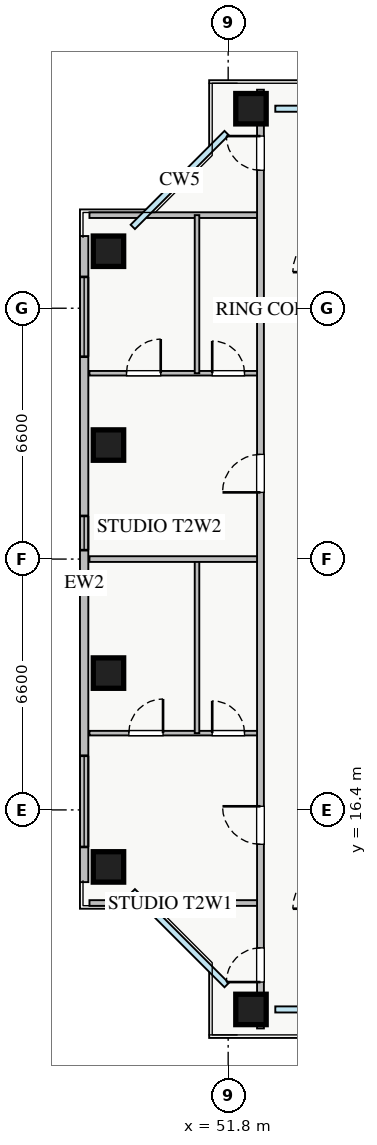
"""IFC4 building model, lengths in metres.
Left out: names, types, materials, properties, quantities, classifications, styles, units other than length and angle.
Written with IfcOpenShell. Run it as: python <this file> out.ifc"""

import sys

from ifc_helpers import new_model, si_unit, direction, frame, frame_2d, origin, origin_2d, place, context, subcontext, project, spatial, rectangle, extrude, source, transform, mapped, element, fill, save


model = new_model("IFC4")
c1 = context("Model", 3, precision=1e-05, world=origin(), true_north=direction((0.0, 1.0)))
c2 = subcontext(c1, "Body", "Model", "MODEL_VIEW")
j1 = project(units=[si_unit("LENGTHUNIT", "METRE"), si_unit("PLANEANGLEUNIT", "RADIAN")], contexts=[c1])
p1 = place(None, origin())
s1 = spatial("IfcSite", under=j1, at=p1, CompositionType="ELEMENT")
p2 = place(p1, origin())
s2 = spatial("IfcBuilding", under=s1, at=p2, CompositionType="ELEMENT")
p3 = place(p2, frame((0.0, 0.0, 86.0)))
s3 = spatial("IfcBuildingStorey", under=s2, at=p3, CompositionType="ELEMENT", Elevation=86.0)
m1 = source(origin(), c2, "Body", "SweptSolid", [
    extrude(rectangle(XDim=0.8, YDim=0.8, at=origin_2d()), origin(), (0.0, 0.0, 1.0), 3.25),
])
for number, where, z_axis, x_axis in (
    (1, (52.4, 11.15, 0.0), (0.0, 0.0, 1.0), (1.0, 0.0, 0.0)),
    (2, (52.4, 34.85, 0.0), (0.0, 0.0, 1.0), (1.0, 0.0, 0.0)),
    (3, (48.65, 14.9, 0.0), (0.0, 0.0, 1.0), (1.0, 0.0, 0.0)),
    (4, (48.65, 20.0, 0.0), (0.0, 0.0, 1.0), (1.0, 0.0, 0.0)),
    (5, (48.65, 26.0, 0.0), (0.0, 0.0, 1.0), (1.0, 0.0, 0.0)),
    (6, (48.65, 31.1, 0.0), (0.0, 0.0, 1.0), (1.0, 0.0, 0.0)),
):
    element("IfcColumn", number, at=place(p3, frame(where, z_axis=z_axis, x_axis=x_axis)), inside=s3, PredefinedType="COLUMN", context=c2, shape_type="MappedRepresentation", body=[
        mapped(m1, transform((0.0, 0.0, 0.0), x_axis=(1.0, 0.0, 0.0), y_axis=(0.0, 1.0, 0.0), z_axis=(0.0, 0.0, 1.0), scale=1.0)),
    ])
p4 = place(p3, frame((48.01, 14.5, 0.0), z_axis=(0.0, 0.0, 1.0), x_axis=(0.0, 1.0, 0.0)))
e7 = element("IfcWall", 7, at=p4, inside=s3, PredefinedType="STANDARD", context=c2, shape_type="SweptSolid", body=[
    extrude(rectangle(XDim=17.0, YDim=0.22, at=frame_2d((8.5, 0.0))), origin(), (0.0, 0.0, 1.0), 2.61),
])
p5 = place(p4, frame((0.925, 0.0, 0.9)))
e8 = element("IfcOpeningElement", 8, at=p5, cuts=e7, PredefinedType="OPENING", context=c2, shape_type="SweptSolid", body=[
    extrude(rectangle(XDim=2.4, YDim=1.48, at=frame_2d((1.2, 0.74))), frame((0.0, 0.12, 0.0), z_axis=(0.0, -1.0, 0.0), x_axis=(1.0, 0.0, 0.0)), (0.0, 0.0, 1.0), 0.24),
])
p6 = place(p4, frame((13.825, 0.0, 0.9)))
e9 = element("IfcOpeningElement", 9, at=p6, cuts=e7, PredefinedType="OPENING", context=c2, shape_type="SweptSolid", body=[
    extrude(rectangle(XDim=2.1, YDim=1.48, at=frame_2d((1.05, 0.74))), frame((0.0, 0.12, 0.0), z_axis=(0.0, -1.0, 0.0), x_axis=(1.0, 0.0, 0.0)), (0.0, 0.0, 1.0), 0.24),
])
p7 = place(p4, frame((8.735, 0.0, 0.9)))
e10 = element("IfcOpeningElement", 10, at=p7, cuts=e7, PredefinedType="OPENING", context=c2, shape_type="SweptSolid", body=[
    extrude(rectangle(XDim=0.9, YDim=1.2, at=frame_2d((0.45, 0.6))), frame((0.0, 0.12, 0.0), z_axis=(0.0, -1.0, 0.0), x_axis=(1.0, 0.0, 0.0)), (0.0, 0.0, 1.0), 0.24),
])
for number, where, z_axis, x_axis in (
    (11, (48.15, 32.05, 0.0), (0.0, 0.0, 1.0), (1.0, 0.0, 0.0)),
    (12, (48.15, 13.95, 0.0), (0.0, 0.0, 1.0), (1.0, 0.0, 0.0)),
):
    element("IfcWall", number, at=place(p3, frame(where, z_axis=z_axis, x_axis=x_axis)), inside=s3, PredefinedType="PARTITIONING", context=c2, shape_type="SweptSolid", body=[
        extrude(rectangle(XDim=4.5, YDim=0.15, at=frame_2d((2.25, 0.0))), origin(), (0.0, 0.0, 1.0), 3.07),
    ])
p8 = place(p3, frame((48.15, 18.42, 0.0), z_axis=(0.0, 0.0, 1.0), x_axis=(1.0, 0.0, 0.0)))
e13 = element("IfcWall", 13, at=p8, inside=s3, PredefinedType="PLUMBINGWALL", context=c2, shape_type="SweptSolid", body=[
    extrude(rectangle(XDim=4.5, YDim=0.12, at=frame_2d((2.25, 0.0))), origin(), (0.0, 0.0, 1.0), 2.815),
])
p9 = place(p8, frame((1.036, 0.0, 0.0)))
e14 = element("IfcOpeningElement", 14, at=p9, cuts=e13, PredefinedType="OPENING", context=c2, shape_type="SweptSolid", body=[
    extrude(rectangle(XDim=0.9, YDim=2.05, at=frame_2d((0.45, 1.025))), frame((0.0, 0.07, 0.0), z_axis=(0.0, -1.0, 0.0), x_axis=(1.0, 0.0, 0.0)), (0.0, 0.0, 1.0), 0.14),
])
p10 = place(p8, frame((3.23, 0.0, 0.0)))
e15 = element("IfcOpeningElement", 15, at=p10, cuts=e13, PredefinedType="OPENING", context=c2, shape_type="SweptSolid", body=[
    extrude(rectangle(XDim=0.85, YDim=2.05, at=frame_2d((0.425, 1.025))), frame((0.0, 0.07, 0.0), z_axis=(0.0, -1.0, 0.0), x_axis=(1.0, 0.0, 0.0)), (0.0, 0.0, 1.0), 0.14),
])
p11 = place(p3, frame((50.98, 18.42, 0.0), z_axis=(0.0, 0.0, 1.0), x_axis=(0.0, 1.0, 0.0)))
e16 = element("IfcWall", 16, at=p11, inside=s3, PredefinedType="PLUMBINGWALL", context=c2, shape_type="SweptSolid", body=[
    extrude(rectangle(XDim=4.58, YDim=0.12, at=frame_2d((2.29, 0.0))), origin(), (0.0, 0.0, 1.0), 3.07),
])
p12 = place(p3, frame((48.15, 27.89, 0.0), z_axis=(0.0, 0.0, 1.0), x_axis=(1.0, 0.0, 0.0)))
e17 = element("IfcWall", 17, at=p12, inside=s3, PredefinedType="PLUMBINGWALL", context=c2, shape_type="SweptSolid", body=[
    extrude(rectangle(XDim=4.5, YDim=0.12, at=frame_2d((2.25, 0.0))), origin(), (0.0, 0.0, 1.0), 3.07),
])
p13 = place(p12, frame((0.975, 0.0, 0.0)))
e18 = element("IfcOpeningElement", 18, at=p13, cuts=e17, PredefinedType="OPENING", context=c2, shape_type="SweptSolid", body=[
    extrude(rectangle(XDim=0.9, YDim=2.05, at=frame_2d((0.45, 1.025))), frame((0.0, 0.07, 0.0), z_axis=(0.0, -1.0, 0.0), x_axis=(1.0, 0.0, 0.0)), (0.0, 0.0, 1.0), 0.14),
])
p14 = place(p12, frame((3.23, 0.0, 0.0)))
e19 = element("IfcOpeningElement", 19, at=p14, cuts=e17, PredefinedType="OPENING", context=c2, shape_type="SweptSolid", body=[
    extrude(rectangle(XDim=0.85, YDim=2.05, at=frame_2d((0.425, 1.025))), frame((0.0, 0.07, 0.0), z_axis=(0.0, -1.0, 0.0), x_axis=(1.0, 0.0, 0.0)), (0.0, 0.0, 1.0), 0.14),
])
p15 = place(p3, frame((50.98, 27.89, 0.0), z_axis=(0.0, 0.0, 1.0), x_axis=(0.0, 1.0, 0.0)))
e20 = element("IfcWall", 20, at=p15, inside=s3, PredefinedType="PLUMBINGWALL", context=c2, shape_type="SweptSolid", body=[
    extrude(rectangle(XDim=4.16, YDim=0.12, at=frame_2d((2.08, 0.0))), origin(), (0.0, 0.0, 1.0), 3.07),
])
p16 = place(p3, frame((48.15, 23.0, 0.0), z_axis=(0.0, 0.0, 1.0), x_axis=(1.0, 0.0, 0.0)))
e21 = element("IfcWall", 21, at=p16, inside=s3, PredefinedType="PARTITIONING", context=c2, shape_type="SweptSolid", body=[
    extrude(rectangle(XDim=4.5, YDim=0.15, at=frame_2d((2.25, 0.0))), origin(), (0.0, 0.0, 1.0), 2.815),
])
p17 = place(p3, frame((52.65, 10.65, 0.0), z_axis=(0.0, 0.0, 1.0), x_axis=(0.0, 1.0, 0.0)))
e22 = element("IfcWall", 22, at=p17, inside=s3, PredefinedType="PARTITIONING", context=c2, shape_type="SweptSolid", body=[
    extrude(rectangle(XDim=24.7, YDim=0.18, at=frame_2d((12.35, 0.0))), origin(), (0.0, 0.0, 1.0), 2.615),
])
p18 = place(p17, frame((22.58, 0.0, 0.0)))
e23 = element("IfcOpeningElement", 23, at=p18, cuts=e22, PredefinedType="OPENING", context=c2, shape_type="SweptSolid", body=[
    extrude(rectangle(XDim=0.9, YDim=2.05, at=frame_2d((0.45, 1.025))), frame((0.0, 0.1, 0.0), z_axis=(0.0, -1.0, 0.0), x_axis=(1.0, 0.0, 0.0)), (0.0, 0.0, 1.0), 0.2),
])
p19 = place(p17, frame((1.22, 0.0, 0.0)))
e24 = element("IfcOpeningElement", 24, at=p19, cuts=e22, PredefinedType="OPENING", context=c2, shape_type="SweptSolid", body=[
    extrude(rectangle(XDim=0.9, YDim=2.05, at=frame_2d((0.45, 1.025))), frame((0.0, 0.1, 0.0), z_axis=(0.0, -1.0, 0.0), x_axis=(1.0, 0.0, 0.0)), (0.0, 0.0, 1.0), 0.2),
])
p20 = place(p17, frame((4.845, 0.0, 0.0)))
e25 = element("IfcOpeningElement", 25, at=p20, cuts=e22, PredefinedType="OPENING", context=c2, shape_type="SweptSolid", body=[
    extrude(rectangle(XDim=1.0, YDim=2.05, at=frame_2d((0.5, 1.025))), frame((0.0, 0.1, 0.0), z_axis=(0.0, -1.0, 0.0), x_axis=(1.0, 0.0, 0.0)), (0.0, 0.0, 1.0), 0.2),
])
p21 = place(p17, frame((14.105, 0.0, 0.0)))
e26 = element("IfcOpeningElement", 26, at=p21, cuts=e22, PredefinedType="OPENING", context=c2, shape_type="SweptSolid", body=[
    extrude(rectangle(XDim=1.0, YDim=2.05, at=frame_2d((0.5, 1.025))), frame((0.0, 0.1, 0.0), z_axis=(0.0, -1.0, 0.0), x_axis=(1.0, 0.0, 0.0)), (0.0, 0.0, 1.0), 0.2),
])
m2 = source(origin(), c2, "Body", "SweptSolid", [
    extrude(rectangle(XDim=2.4, YDim=1.48, at=frame_2d((1.2, 0.74))), frame((0.0, 0.03, 0.0), z_axis=(0.0, -1.0, 0.0), x_axis=(1.0, 0.0, 0.0)), (0.0, 0.0, 1.0), 0.06),
])
p22 = place(p5, origin())
e27 = element("IfcWindow", 27, at=p22, inside=s3, PartitioningType="TRIPLE_PANEL_VERTICAL", PredefinedType="WINDOW", context=c2, shape_type="MappedRepresentation", body=[
    mapped(m2, transform((0.0, 0.0, 0.0), x_axis=(1.0, 0.0, 0.0), y_axis=(0.0, 1.0, 0.0), z_axis=(0.0, 0.0, 1.0), scale=1.0)),
])
fill(e8, e27)
m3 = source(origin(), c2, "Body", "SweptSolid", [
    extrude(rectangle(XDim=2.1, YDim=1.48, at=frame_2d((1.05, 0.74))), frame((0.0, 0.03, 0.0), z_axis=(0.0, -1.0, 0.0), x_axis=(1.0, 0.0, 0.0)), (0.0, 0.0, 1.0), 0.06),
])
p23 = place(p6, origin())
e28 = element("IfcWindow", 28, at=p23, inside=s3, PartitioningType="TRIPLE_PANEL_VERTICAL", PredefinedType="WINDOW", context=c2, shape_type="MappedRepresentation", body=[
    mapped(m3, transform((0.0, 0.0, 0.0), x_axis=(1.0, 0.0, 0.0), y_axis=(0.0, 1.0, 0.0), z_axis=(0.0, 0.0, 1.0), scale=1.0)),
])
fill(e9, e28)
m4 = source(origin(), c2, "Body", "SweptSolid", [
    extrude(rectangle(XDim=0.9, YDim=2.05, at=frame_2d((0.45, 1.025))), frame((0.0, 0.025, 0.0), z_axis=(0.0, -1.0, 0.0), x_axis=(1.0, 0.0, 0.0)), (0.0, 0.0, 1.0), 0.05),
])
p24 = place(p9, origin())
e29 = element("IfcDoor", 29, at=p24, inside=s3, OperationType="SINGLE_SWING_RIGHT", PredefinedType="DOOR", context=c2, shape_type="MappedRepresentation", body=[
    mapped(m4, transform((0.0, 0.0, 0.0), x_axis=(1.0, 0.0, 0.0), y_axis=(0.0, 1.0, 0.0), z_axis=(0.0, 0.0, 1.0), scale=1.0)),
])
fill(e14, e29)
m5 = source(origin(), c2, "Body", "SweptSolid", [
    extrude(rectangle(XDim=0.85, YDim=2.05, at=frame_2d((0.425, 1.025))), frame((0.0, 0.025, 0.0), z_axis=(0.0, -1.0, 0.0), x_axis=(1.0, 0.0, 0.0)), (0.0, 0.0, 1.0), 0.05),
])
p25 = place(p10, origin())
e30 = element("IfcDoor", 30, at=p25, inside=s3, OperationType="SINGLE_SWING_LEFT", PredefinedType="DOOR", context=c2, shape_type="MappedRepresentation", body=[
    mapped(m5, transform((0.0, 0.0, 0.0), x_axis=(1.0, 0.0, 0.0), y_axis=(0.0, 1.0, 0.0), z_axis=(0.0, 0.0, 1.0), scale=1.0)),
])
fill(e15, e30)
p26 = place(p13, origin())
e31 = element("IfcDoor", 31, at=p26, inside=s3, OperationType="SINGLE_SWING_RIGHT", PredefinedType="DOOR", context=c2, shape_type="MappedRepresentation", body=[
    mapped(m4, transform((0.0, 0.0, 0.0), x_axis=(1.0, 0.0, 0.0), y_axis=(0.0, 1.0, 0.0), z_axis=(0.0, 0.0, 1.0), scale=1.0)),
])
fill(e18, e31)
p27 = place(p14, origin())
e32 = element("IfcDoor", 32, at=p27, inside=s3, OperationType="SINGLE_SWING_LEFT", PredefinedType="DOOR", context=c2, shape_type="MappedRepresentation", body=[
    mapped(m5, transform((0.0, 0.0, 0.0), x_axis=(1.0, 0.0, 0.0), y_axis=(0.0, 1.0, 0.0), z_axis=(0.0, 0.0, 1.0), scale=1.0)),
])
fill(e19, e32)
p28 = place(p18, origin())
e33 = element("IfcDoor", 33, at=p28, inside=s3, OperationType="SINGLE_SWING_RIGHT", PredefinedType="DOOR", context=c2, shape_type="MappedRepresentation", body=[
    mapped(m4, transform((0.0, 0.0, 0.0), x_axis=(1.0, 0.0, 0.0), y_axis=(0.0, 1.0, 0.0), z_axis=(0.0, 0.0, 1.0), scale=1.0)),
])
fill(e23, e33)
p29 = place(p19, origin())
e34 = element("IfcDoor", 34, at=p29, inside=s3, OperationType="SINGLE_SWING_LEFT", PredefinedType="DOOR", context=c2, shape_type="MappedRepresentation", body=[
    mapped(m4, transform((0.0, 0.0, 0.0), x_axis=(1.0, 0.0, 0.0), y_axis=(0.0, 1.0, 0.0), z_axis=(0.0, 0.0, 1.0), scale=1.0)),
])
fill(e24, e34)
m6 = source(origin(), c2, "Body", "SweptSolid", [
    extrude(rectangle(XDim=1.0, YDim=2.05, at=frame_2d((0.5, 1.025))), frame((0.0, 0.025, 0.0), z_axis=(0.0, -1.0, 0.0), x_axis=(1.0, 0.0, 0.0)), (0.0, 0.0, 1.0), 0.05),
])
p30 = place(p20, origin())
e35 = element("IfcDoor", 35, at=p30, inside=s3, OperationType="SINGLE_SWING_RIGHT", PredefinedType="DOOR", context=c2, shape_type="MappedRepresentation", body=[
    mapped(m6, transform((0.0, 0.0, 0.0), x_axis=(1.0, 0.0, 0.0), y_axis=(0.0, 1.0, 0.0), z_axis=(0.0, 0.0, 1.0), scale=1.0)),
])
fill(e25, e35)
p31 = place(p21, origin())
e36 = element("IfcDoor", 36, at=p31, inside=s3, OperationType="SINGLE_SWING_LEFT", PredefinedType="DOOR", context=c2, shape_type="MappedRepresentation", body=[
    mapped(m6, transform((0.0, 0.0, 0.0), x_axis=(1.0, 0.0, 0.0), y_axis=(0.0, 1.0, 0.0), z_axis=(0.0, 0.0, 1.0), scale=1.0)),
])
fill(e26, e36)
m7 = source(origin(), c2, "Body", "SweptSolid", [
    extrude(rectangle(XDim=0.9, YDim=1.2, at=frame_2d((0.45, 0.6))), frame((0.0, 0.03, 0.0), z_axis=(0.0, -1.0, 0.0), x_axis=(1.0, 0.0, 0.0)), (0.0, 0.0, 1.0), 0.06),
])
p32 = place(p7, origin())
e37 = element("IfcWindow", 37, at=p32, inside=s3, PartitioningType="SINGLE_PANEL", PredefinedType="WINDOW", context=c2, shape_type="MappedRepresentation", body=[
    mapped(m7, transform((0.0, 0.0, 0.0), x_axis=(1.0, 0.0, 0.0), y_axis=(0.0, 1.0, 0.0), z_axis=(0.0, 0.0, 1.0), scale=1.0)),
])
fill(e10, e37)
save(model, sys.argv[1])
